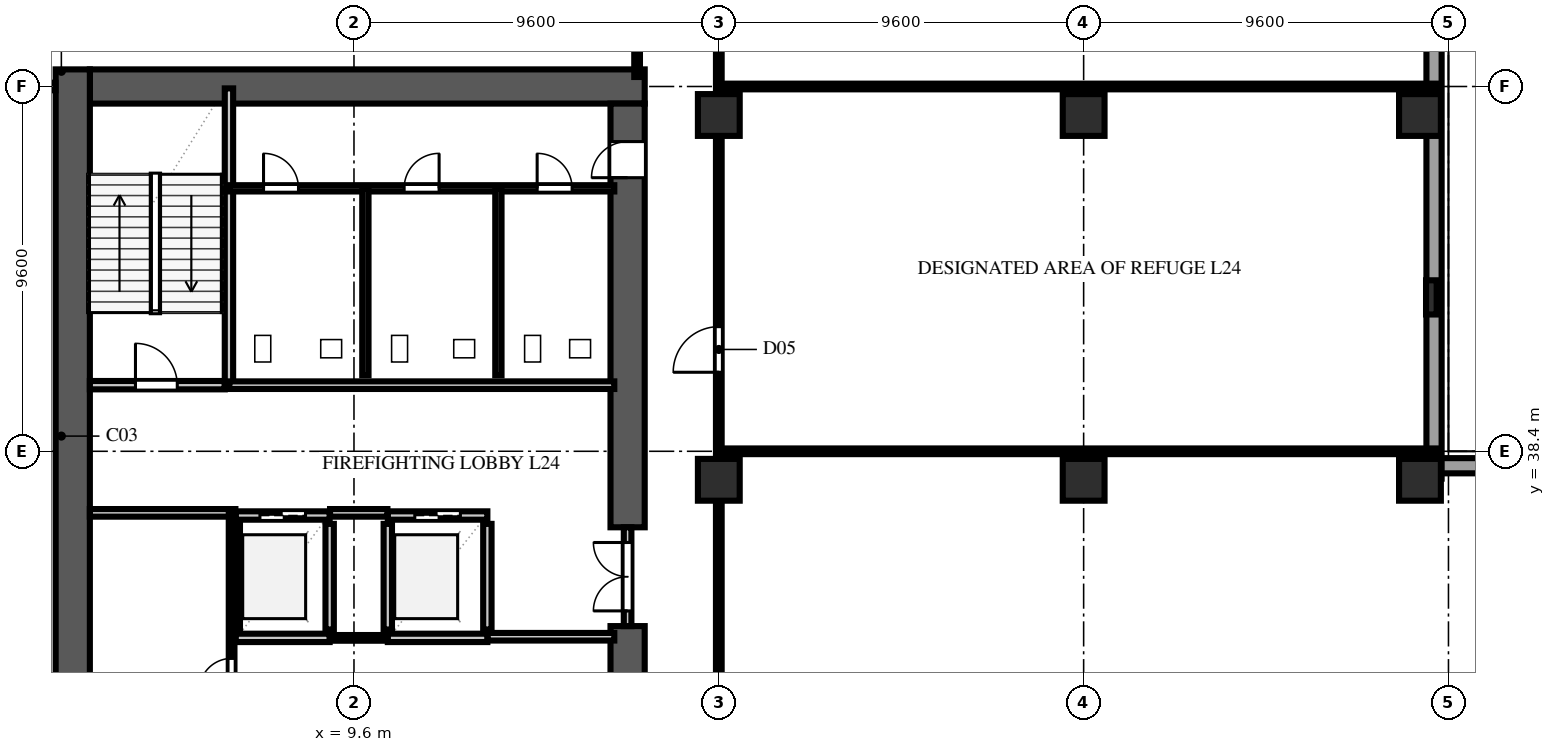
"""IFC4 building model, lengths in metres.
Left out: names, types, materials, properties, quantities, classifications, styles, units other than length and angle.
Written with IfcOpenShell. Run it as: python <this file> out.ifc"""

import sys

from ifc_helpers import new_model, si_unit, direction, frame, frame_2d, origin, origin_2d, place, context, subcontext, project, spatial, rectangle, extrude, element, fill, save


model = new_model("IFC4")
c1 = context("Model", 3, precision=1e-05, world=origin(), true_north=direction((0.0, 1.0)))
c2 = subcontext(c1, "Body", "Model", "MODEL_VIEW")
j1 = project(units=[si_unit("LENGTHUNIT", "METRE"), si_unit("PLANEANGLEUNIT", "RADIAN")], contexts=[c1])
p1 = place(None, origin())
s1 = spatial("IfcSite", under=j1, at=p1, CompositionType="ELEMENT")
p2 = place(p1, origin())
s2 = spatial("IfcBuilding", under=s1, at=p2, CompositionType="ELEMENT")
p3 = place(p2, frame((0.0, 0.0, 96.4)))
s3 = spatial("IfcBuildingStorey", under=s2, at=p3, CompositionType="ELEMENT", Elevation=96.4)
p4 = place(p3, frame((2.65, 48.0, 0.0), z_axis=(0.0, 0.0, 1.0), x_axis=(1.0, 0.0, 0.0)))
e1 = element("IfcWall", 1, at=p4, inside=s3, PredefinedType="SHEAR", context=c2, shape_type="SweptSolid", body=[
    extrude(rectangle(XDim=14.6, YDim=0.9, at=frame_2d((7.3, 0.0))), origin(), (0.0, 0.0, 1.0), 4.74),
])
p5 = place(p3, frame((2.2, 9.15, 0.0), z_axis=(0.0, 0.0, 1.0), x_axis=(0.0, 1.0, 0.0)))
e2 = element("IfcWall", 2, at=p5, inside=s3, PredefinedType="SHEAR", context=c2, shape_type="SweptSolid", body=[
    extrude(rectangle(XDim=39.3, YDim=0.9, at=frame_2d((19.65, 0.0))), origin(), (0.0, 0.0, 1.0), 4.74),
])
p6 = place(p3, frame((16.8, 26.0, 0.0), z_axis=(0.0, 0.0, 1.0), x_axis=(0.0, 1.0, 0.0)))
e3 = element("IfcWall", 3, at=p6, inside=s3, PredefinedType="SHEAR", context=c2, shape_type="SweptSolid", body=[
    extrude(rectangle(XDim=7.8, YDim=0.9, at=frame_2d((3.9, 0.0))), origin(), (0.0, 0.0, 1.0), 4.74),
])
p7 = place(p3, frame((16.8, 36.4, 0.0), z_axis=(0.0, 0.0, 1.0), x_axis=(0.0, 1.0, 0.0)))
e4 = element("IfcWall", 4, at=p7, inside=s3, PredefinedType="SHEAR", context=c2, shape_type="SweptSolid", body=[
    extrude(rectangle(XDim=11.15, YDim=0.9, at=frame_2d((5.575, 0.0))), origin(), (0.0, 0.0, 1.0), 4.74),
])
p8 = place(p7, frame((9.2, 0.0, 0.0)))
e5 = element("IfcOpeningElement", 5, at=p8, cuts=e4, PredefinedType="OPENING", context=c2, shape_type="SweptSolid", body=[
    extrude(rectangle(XDim=0.95, YDim=2.15, at=frame_2d((0.475, 1.075))), frame((0.0, 0.462, 0.0), z_axis=(0.0, -1.0, 0.0), x_axis=(1.0, 0.0, 0.0)), (0.0, 0.0, 1.0), 0.924),
])
for number, where, z_axis, x_axis in (
    (6, (19.2, 37.65, 0.0), (0.0, 0.0, 1.0), (1.0, 0.0, 0.0)),
    (7, (19.2, 47.25, 0.0), (0.0, 0.0, 1.0), (1.0, 0.0, 0.0)),
    (8, (28.8, 37.65, 0.0), (0.0, 0.0, 1.0), (1.0, 0.0, 0.0)),
    (9, (28.8, 47.25, 0.0), (0.0, 0.0, 1.0), (1.0, 0.0, 0.0)),
    (10, (37.65, 37.65, 0.0), (0.0, 0.0, 1.0), (1.0, 0.0, 0.0)),
    (11, (37.65, 47.25, 0.0), (0.0, 0.0, 1.0), (1.0, 0.0, 0.0)),
):
    element("IfcColumn", number, at=place(p3, frame(where, z_axis=z_axis, x_axis=x_axis)), inside=s3, PredefinedType="COLUMN", context=c2, shape_type="SweptSolid", body=[
        extrude(rectangle(XDim=1.1, YDim=1.1, at=origin_2d()), origin(), (0.0, 0.0, 1.0), 5.0),
    ])
p9 = place(p3, frame((37.95, 42.45, 0.0), z_axis=(0.0, 0.0, 1.0), x_axis=(0.0, 1.0, 0.0)))
e12 = element("IfcColumn", 12, at=p9, inside=s3, PredefinedType="PILASTER", context=c2, shape_type="SweptSolid", body=[
    extrude(rectangle(XDim=0.9, YDim=0.28, at=origin_2d()), origin(), (0.0, 0.0, 1.0), 5.0),
])
for number, where, z_axis, x_axis in (
    (13, (65.36, 38.02, 0.0), (0.0, 0.0, 1.0), (-1.0, 0.0, 0.0)),
    (14, (38.02, 37.68, 0.0), (0.0, 0.0, 1.0), (0.0, 1.0, 0.0)),
):
    element("IfcWall", number, at=place(p3, frame(where, z_axis=z_axis, x_axis=x_axis)), inside=s3, PredefinedType="SOLIDWALL", context=c2, shape_type="SweptSolid", body=[
        extrude(rectangle(XDim=27.68, YDim=0.4, at=frame_2d((13.84, 0.0))), origin(), (0.0, 0.0, 1.0), 4.74),
    ])
p10 = place(p3, frame((2.65, 40.14, 0.0), z_axis=(0.0, 0.0, 1.0), x_axis=(1.0, 0.0, 0.0)))
e15 = element("IfcWall", 15, at=p10, inside=s3, PredefinedType="SOLIDWALL", context=c2, shape_type="SweptSolid", body=[
    extrude(rectangle(XDim=3.55, YDim=0.22, at=frame_2d((1.775, 0.0))), origin(), (0.0, 0.0, 1.0), 4.74),
])
p11 = place(p10, frame((1.2, 0.0, 0.0)))
e16 = element("IfcOpeningElement", 16, at=p11, cuts=e15, PredefinedType="OPENING", context=c2, shape_type="SweptSolid", body=[
    extrude(rectangle(XDim=1.1, YDim=2.2, at=frame_2d((0.55, 1.1))), frame((0.0, 0.122, 0.0), z_axis=(0.0, -1.0, 0.0), x_axis=(1.0, 0.0, 0.0)), (0.0, 0.0, 1.0), 0.244),
])
p12 = place(p3, frame((6.31, 40.14, 0.0), z_axis=(0.0, 0.0, 1.0), x_axis=(0.0, 1.0, 0.0)))
e17 = element("IfcWall", 17, at=p12, inside=s3, PredefinedType="SOLIDWALL", context=c2, shape_type="SweptSolid", body=[
    extrude(rectangle(XDim=7.81, YDim=0.22, at=frame_2d((3.905, 0.0))), origin(), (0.0, 0.0, 1.0), 4.74),
])
for number, where, z_axis, x_axis in (
    (18, (6.49, 33.71, 0.0), (0.0, 0.0, 1.0), (0.0, 1.0, 0.0)),
    (19, (8.96, 33.71, 0.0), (0.0, 0.0, 1.0), (0.0, 1.0, 0.0)),
):
    element("IfcWall", number, at=place(p3, frame(where, z_axis=z_axis, x_axis=x_axis)), inside=s3, PredefinedType="SOLIDWALL", context=c2, shape_type="SweptSolid", body=[
        extrude(rectangle(XDim=2.78, YDim=0.22, at=frame_2d((1.39, 0.0))), origin(), (0.0, 0.0, 1.0), 4.74),
    ])
p13 = place(p3, frame((6.49, 33.49, 0.0), z_axis=(0.0, 0.0, 1.0), x_axis=(1.0, 0.0, 0.0)))
e20 = element("IfcWall", 20, at=p13, inside=s3, PredefinedType="SOLIDWALL", context=c2, shape_type="SweptSolid", body=[
    extrude(rectangle(XDim=2.47, YDim=0.22, at=frame_2d((1.235, 0.0))), origin(), (0.0, 0.0, 1.0), 4.74),
])
p14 = place(p3, frame((6.49, 36.71, 0.0), z_axis=(0.0, 0.0, 1.0), x_axis=(1.0, 0.0, 0.0)))
e21 = element("IfcWall", 21, at=p14, inside=s3, PredefinedType="SOLIDWALL", context=c2, shape_type="SweptSolid", body=[
    extrude(rectangle(XDim=2.47, YDim=0.22, at=frame_2d((1.235, 0.0))), origin(), (0.0, 0.0, 1.0), 4.74),
])
p15 = place(p14, frame((0.635, 0.0, 0.0)))
e22 = element("IfcOpeningElement", 22, at=p15, cuts=e21, PredefinedType="OPENING", context=c2, shape_type="SweptSolid", body=[
    extrude(rectangle(XDim=1.2, YDim=2.2, at=frame_2d((0.6, 1.1))), frame((0.0, 0.122, 0.0), z_axis=(0.0, -1.0, 0.0), x_axis=(1.0, 0.0, 0.0)), (0.0, 0.0, 1.0), 0.244),
])
for number, where, z_axis, x_axis in (
    (23, (10.49, 33.71, 0.0), (0.0, 0.0, 1.0), (0.0, 1.0, 0.0)),
    (24, (13.11, 33.71, 0.0), (0.0, 0.0, 1.0), (0.0, 1.0, 0.0)),
):
    element("IfcWall", number, at=place(p3, frame(where, z_axis=z_axis, x_axis=x_axis)), inside=s3, PredefinedType="SOLIDWALL", context=c2, shape_type="SweptSolid", body=[
        extrude(rectangle(XDim=2.78, YDim=0.22, at=frame_2d((1.39, 0.0))), origin(), (0.0, 0.0, 1.0), 4.74),
    ])
p16 = place(p3, frame((10.49, 33.49, 0.0), z_axis=(0.0, 0.0, 1.0), x_axis=(1.0, 0.0, 0.0)))
e25 = element("IfcWall", 25, at=p16, inside=s3, PredefinedType="SOLIDWALL", context=c2, shape_type="SweptSolid", body=[
    extrude(rectangle(XDim=2.62, YDim=0.22, at=frame_2d((1.31, 0.0))), origin(), (0.0, 0.0, 1.0), 4.74),
])
p17 = place(p3, frame((10.49, 36.71, 0.0), z_axis=(0.0, 0.0, 1.0), x_axis=(1.0, 0.0, 0.0)))
e26 = element("IfcWall", 26, at=p17, inside=s3, PredefinedType="SOLIDWALL", context=c2, shape_type="SweptSolid", body=[
    extrude(rectangle(XDim=2.62, YDim=0.22, at=frame_2d((1.31, 0.0))), origin(), (0.0, 0.0, 1.0), 4.74),
])
p18 = place(p17, frame((0.71, 0.0, 0.0)))
e27 = element("IfcOpeningElement", 27, at=p18, cuts=e26, PredefinedType="OPENING", context=c2, shape_type="SweptSolid", body=[
    extrude(rectangle(XDim=1.2, YDim=2.2, at=frame_2d((0.6, 1.1))), frame((0.0, 0.122, 0.0), z_axis=(0.0, -1.0, 0.0), x_axis=(1.0, 0.0, 0.0)), (0.0, 0.0, 1.0), 0.244),
])
p19 = place(p3, frame((2.65, 36.78, 0.0), z_axis=(0.0, 0.0, 1.0), x_axis=(1.0, 0.0, 0.0)))
e28 = element("IfcWall", 28, at=p19, inside=s3, PredefinedType="SOLIDWALL", context=c2, shape_type="SweptSolid", body=[
    extrude(rectangle(XDim=3.83, YDim=0.2, at=frame_2d((1.915, 0.0))), origin(), (0.0, 0.0, 1.0), 4.74),
])
p20 = place(p3, frame((8.97, 36.78, 0.0), z_axis=(0.0, 0.0, 1.0), x_axis=(1.0, 0.0, 0.0)))
e29 = element("IfcWall", 29, at=p20, inside=s3, PredefinedType="SOLIDWALL", context=c2, shape_type="SweptSolid", body=[
    extrude(rectangle(XDim=1.51, YDim=0.2, at=frame_2d((0.755, 0.0))), origin(), (0.0, 0.0, 1.0), 4.74),
])
p21 = place(p3, frame((13.12, 33.52, 0.0), z_axis=(0.0, 0.0, 1.0), x_axis=(1.0, 0.0, 0.0)))
e30 = element("IfcWall", 30, at=p21, inside=s3, PredefinedType="SOLIDWALL", context=c2, shape_type="SweptSolid", body=[
    extrude(rectangle(XDim=3.33, YDim=0.2, at=frame_2d((1.665, 0.0))), origin(), (0.0, 0.0, 1.0), 4.74),
])
p22 = place(p3, frame((6.32, 40.14, 0.0), z_axis=(0.0, 0.0, 1.0), x_axis=(1.0, 0.0, 0.0)))
e31 = element("IfcWall", 31, at=p22, inside=s3, PredefinedType="SOLIDWALL", context=c2, shape_type="SweptSolid", body=[
    extrude(rectangle(XDim=10.13, YDim=0.2, at=frame_2d((5.065, 0.0))), origin(), (0.0, 0.0, 1.0), 4.74),
])
p23 = place(p3, frame((16.8, 33.8, 0.0), z_axis=(0.0, 0.0, 1.0), x_axis=(0.0, 1.0, 0.0)))
e32 = element("IfcWall", 32, at=p23, inside=s3, PredefinedType="SOLIDWALL", context=c2, shape_type="SweptSolid", body=[
    extrude(rectangle(XDim=2.6, YDim=0.2, at=frame_2d((1.3, 0.0))), origin(), (0.0, 0.0, 1.0), 4.74),
])
p24 = place(p23, frame((0.4, 0.0, 0.0)))
e33 = element("IfcOpeningElement", 33, at=p24, cuts=e32, PredefinedType="OPENING", context=c2, shape_type="SweptSolid", body=[
    extrude(rectangle(XDim=1.8, YDim=2.2, at=frame_2d((0.9, 1.1))), frame((0.0, 0.112, 0.0), z_axis=(0.0, -1.0, 0.0), x_axis=(1.0, 0.0, 0.0)), (0.0, 0.0, 1.0), 0.224),
])
p25 = place(p3, frame((8.965, 33.49, 0.0), z_axis=(0.0, 0.0, 1.0), x_axis=(1.0, 0.0, 0.0)))
e34 = element("IfcWall", 34, at=p25, inside=s3, PredefinedType="PARTITIONING", context=c2, shape_type="SweptSolid", body=[
    extrude(rectangle(XDim=1.52, YDim=0.15, at=frame_2d((0.76, 0.0))), origin(), (0.0, 0.0, 1.0), 4.74),
])
p26 = place(p3, frame((6.38, 17.8, 0.0), z_axis=(0.0, 0.0, 1.0), x_axis=(0.0, 1.0, 0.0)))
e35 = element("IfcWall", 35, at=p26, inside=s3, PredefinedType="PARTITIONING", context=c2, shape_type="SweptSolid", body=[
    extrude(rectangle(XDim=18.98, YDim=0.15, at=frame_2d((9.49, 0.0))), origin(), (0.0, 0.0, 1.0), 4.74),
])
p27 = place(p26, frame((14.3, 0.0, 0.0)))
e36 = element("IfcOpeningElement", 36, at=p27, cuts=e35, PredefinedType="OPENING", context=c2, shape_type="SweptSolid", body=[
    extrude(rectangle(XDim=0.85, YDim=2.1, at=frame_2d((0.425, 1.05))), frame((0.0, 0.087, 0.0), z_axis=(0.0, -1.0, 0.0), x_axis=(1.0, 0.0, 0.0)), (0.0, 0.0, 1.0), 0.174),
])
p28 = place(p3, frame((6.32, 45.32, 0.0), z_axis=(0.0, 0.0, 1.0), x_axis=(1.0, 0.0, 0.0)))
e37 = element("IfcWall", 37, at=p28, inside=s3, PredefinedType="PLUMBINGWALL", context=c2, shape_type="SweptSolid", body=[
    extrude(rectangle(XDim=10.13, YDim=0.165, at=frame_2d((5.065, 0.0))), origin(), (0.0, 0.0, 1.0), 4.74),
])
p29 = place(p28, frame((0.9, 0.0, 0.0)))
e38 = element("IfcOpeningElement", 38, at=p29, cuts=e37, PredefinedType="OPENING", context=c2, shape_type="SweptSolid", body=[
    extrude(rectangle(XDim=0.92, YDim=2.15, at=frame_2d((0.46, 1.075))), frame((0.0, 0.094, 0.0), z_axis=(0.0, -1.0, 0.0), x_axis=(1.0, 0.0, 0.0)), (0.0, 0.0, 1.0), 0.189),
])
p30 = place(p28, frame((4.6, 0.0, 0.0)))
e39 = element("IfcOpeningElement", 39, at=p30, cuts=e37, PredefinedType="OPENING", context=c2, shape_type="SweptSolid", body=[
    extrude(rectangle(XDim=0.92, YDim=2.15, at=frame_2d((0.46, 1.075))), frame((0.0, 0.094, 0.0), z_axis=(0.0, -1.0, 0.0), x_axis=(1.0, 0.0, 0.0)), (0.0, 0.0, 1.0), 0.189),
])
p31 = place(p28, frame((8.1, 0.0, 0.0)))
e40 = element("IfcOpeningElement", 40, at=p31, cuts=e37, PredefinedType="OPENING", context=c2, shape_type="SweptSolid", body=[
    extrude(rectangle(XDim=0.92, YDim=2.15, at=frame_2d((0.46, 1.075))), frame((0.0, 0.094, 0.0), z_axis=(0.0, -1.0, 0.0), x_axis=(1.0, 0.0, 0.0)), (0.0, 0.0, 1.0), 0.189),
])
for number, where, z_axis, x_axis in (
    (41, (9.9, 40.4, 0.0), (0.0, 0.0, 1.0), (0.0, 1.0, 0.0)),
    (42, (13.4, 40.4, 0.0), (0.0, 0.0, 1.0), (0.0, 1.0, 0.0)),
):
    element("IfcWall", number, at=place(p3, frame(where, z_axis=z_axis, x_axis=x_axis)), inside=s3, PredefinedType="PLUMBINGWALL", context=c2, shape_type="SweptSolid", body=[
        extrude(rectangle(XDim=4.92, YDim=0.165, at=frame_2d((2.46, 0.0))), origin(), (0.0, 0.0, 1.0), 4.74),
    ])
p32 = place(p3, frame((0.85, 48.0, 0.0), z_axis=(0.0, 0.0, 1.0), x_axis=(1.0, 0.0, 0.0)))
e43 = element("IfcWall", 43, at=p32, inside=s3, PredefinedType="SOLIDWALL", context=c2, shape_type="SweptSolid", body=[
    extrude(rectangle(XDim=0.895, YDim=0.2, at=frame_2d((0.448, 0.0))), origin(), (0.0, 0.0, 1.0), 4.74),
])
for number, where, z_axis, x_axis in (
    (44, (19.2, 38.4, 0.0), (0.0, 0.0, 1.0), (1.0, 0.0, 0.0)),
    (45, (19.2, 48.0, 0.0), (0.0, 0.0, 1.0), (1.0, 0.0, 0.0)),
):
    element("IfcWall", number, at=place(p3, frame(where, z_axis=z_axis, x_axis=x_axis)), inside=s3, PredefinedType="PARTITIONING", context=c2, shape_type="SweptSolid", body=[
        extrude(rectangle(XDim=18.98, YDim=0.15, at=frame_2d((9.49, 0.0))), origin(), (0.0, 0.0, 1.0), 4.74),
    ])
p33 = place(p3, frame((19.2, 9.98, 0.0), z_axis=(0.0, 0.0, 1.0), x_axis=(0.0, 1.0, 0.0)))
e46 = element("IfcWall", 46, at=p33, inside=s3, PredefinedType="PARTITIONING", context=c2, shape_type="SweptSolid", body=[
    extrude(rectangle(XDim=56.47, YDim=0.15, at=frame_2d((28.235, 0.0))), origin(), (0.0, 0.0, 1.0), 3.967),
])
p34 = place(p33, frame((2.0, 0.0, 0.0)))
e47 = element("IfcOpeningElement", 47, at=p34, cuts=e46, PredefinedType="OPENING", context=c2, shape_type="SweptSolid", body=[
    extrude(rectangle(XDim=1.8, YDim=2.2, at=frame_2d((0.9, 1.1))), frame((0.0, 0.087, 0.0), z_axis=(0.0, -1.0, 0.0), x_axis=(1.0, 0.0, 0.0)), (0.0, 0.0, 1.0), 0.174),
])
p35 = place(p33, frame((12.0, 0.0, 0.0)))
e48 = element("IfcOpeningElement", 48, at=p35, cuts=e46, PredefinedType="OPENING", context=c2, shape_type="SweptSolid", body=[
    extrude(rectangle(XDim=1.8, YDim=2.2, at=frame_2d((0.9, 1.1))), frame((0.0, 0.087, 0.0), z_axis=(0.0, -1.0, 0.0), x_axis=(1.0, 0.0, 0.0)), (0.0, 0.0, 1.0), 0.174),
])
p36 = place(p33, frame((30.5, 0.0, 0.0)))
e49 = element("IfcOpeningElement", 49, at=p36, cuts=e46, PredefinedType="OPENING", context=c2, shape_type="SweptSolid", body=[
    extrude(rectangle(XDim=1.2, YDim=2.2, at=frame_2d((0.6, 1.1))), frame((0.0, 0.087, 0.0), z_axis=(0.0, -1.0, 0.0), x_axis=(1.0, 0.0, 0.0)), (0.0, 0.0, 1.0), 0.174),
])
p37 = place(p33, frame((40.5, 0.0, 0.0)))
e50 = element("IfcOpeningElement", 50, at=p37, cuts=e46, PredefinedType="OPENING", context=c2, shape_type="SweptSolid", body=[
    extrude(rectangle(XDim=1.8, YDim=2.2, at=frame_2d((0.9, 1.1))), frame((0.0, 0.087, 0.0), z_axis=(0.0, -1.0, 0.0), x_axis=(1.0, 0.0, 0.0)), (0.0, 0.0, 1.0), 0.174),
])
p38 = place(p3, frame((17.05, 48.25, 0.0), z_axis=(0.0, 0.0, 1.0), x_axis=(0.0, 1.0, 0.0)))
e51 = element("IfcWall", 51, at=p38, inside=s3, PredefinedType="PARTITIONING", context=c2, shape_type="SweptSolid", body=[
    extrude(rectangle(XDim=18.73, YDim=0.15, at=frame_2d((9.365, 0.0))), origin(), (0.0, 0.0, 1.0), 4.74),
])
p39 = place(p38, frame((2.2, 0.0, 0.0)))
e52 = element("IfcOpeningElement", 52, at=p39, cuts=e51, PredefinedType="OPENING", context=c2, shape_type="SweptSolid", body=[
    extrude(rectangle(XDim=1.8, YDim=2.2, at=frame_2d((0.9, 1.1))), frame((0.0, 0.087, 0.0), z_axis=(0.0, -1.0, 0.0), x_axis=(1.0, 0.0, 0.0)), (0.0, 0.0, 1.0), 0.174),
])
p40 = place(p11, origin())
e53 = element("IfcDoor", 53, at=p40, inside=s3, OperationType="SINGLE_SWING_LEFT", PredefinedType="DOOR", context=c2, shape_type="SweptSolid", body=[
    extrude(rectangle(XDim=1.1, YDim=2.2, at=frame_2d((0.55, 1.1))), frame((0.0, 0.025, 0.0), z_axis=(0.0, -1.0, 0.0), x_axis=(1.0, 0.0, 0.0)), (0.0, 0.0, 1.0), 0.05),
])
fill(e16, e53)
p41 = place(p15, origin())
e54 = element("IfcDoor", 54, at=p41, inside=s3, OperationType="DOUBLE_DOOR_SLIDING", PredefinedType="DOOR", context=c2, shape_type="SweptSolid", body=[
    extrude(rectangle(XDim=1.2, YDim=2.2, at=frame_2d((0.6, 1.1))), frame((0.0, 0.025, 0.0), z_axis=(0.0, -1.0, 0.0), x_axis=(1.0, 0.0, 0.0)), (0.0, 0.0, 1.0), 0.05),
])
fill(e22, e54)
p42 = place(p18, origin())
e55 = element("IfcDoor", 55, at=p42, inside=s3, OperationType="DOUBLE_DOOR_SLIDING", PredefinedType="DOOR", context=c2, shape_type="SweptSolid", body=[
    extrude(rectangle(XDim=1.2, YDim=2.2, at=frame_2d((0.6, 1.1))), frame((0.0, 0.025, 0.0), z_axis=(0.0, -1.0, 0.0), x_axis=(1.0, 0.0, 0.0)), (0.0, 0.0, 1.0), 0.05),
])
fill(e27, e55)
p43 = place(p8, origin())
e56 = element("IfcDoor", 56, at=p43, inside=s3, OperationType="SINGLE_SWING_LEFT", PredefinedType="DOOR", context=c2, shape_type="SweptSolid", body=[
    extrude(rectangle(XDim=0.95, YDim=2.15, at=frame_2d((0.475, 1.075))), frame((0.0, 0.025, 0.0), z_axis=(0.0, -1.0, 0.0), x_axis=(1.0, 0.0, 0.0)), (0.0, 0.0, 1.0), 0.05),
])
fill(e5, e56)
p44 = place(p24, origin())
e57 = element("IfcDoor", 57, at=p44, inside=s3, OperationType="DOUBLE_DOOR_SINGLE_SWING", PredefinedType="DOOR", context=c2, shape_type="SweptSolid", body=[
    extrude(rectangle(XDim=1.8, YDim=2.2, at=frame_2d((0.9, 1.1))), frame((0.0, 0.025, 0.0), z_axis=(0.0, -1.0, 0.0), x_axis=(1.0, 0.0, 0.0)), (0.0, 0.0, 1.0), 0.05),
])
fill(e33, e57)
p45 = place(p27, origin())
e58 = element("IfcDoor", 58, at=p45, inside=s3, OperationType="SINGLE_SWING_LEFT", PredefinedType="DOOR", context=c2, shape_type="SweptSolid", body=[
    extrude(rectangle(XDim=0.85, YDim=2.1, at=frame_2d((0.425, 1.05))), frame((0.0, 0.025, 0.0), z_axis=(0.0, -1.0, 0.0), x_axis=(1.0, 0.0, 0.0)), (0.0, 0.0, 1.0), 0.05),
])
fill(e36, e58)
p46 = place(p29, origin())
e59 = element("IfcDoor", 59, at=p46, inside=s3, OperationType="SINGLE_SWING_LEFT", PredefinedType="DOOR", context=c2, shape_type="SweptSolid", body=[
    extrude(rectangle(XDim=0.92, YDim=2.15, at=frame_2d((0.46, 1.075))), frame((0.0, 0.025, 0.0), z_axis=(0.0, -1.0, 0.0), x_axis=(1.0, 0.0, 0.0)), (0.0, 0.0, 1.0), 0.05),
])
fill(e38, e59)
p47 = place(p30, origin())
e60 = element("IfcDoor", 60, at=p47, inside=s3, OperationType="SINGLE_SWING_RIGHT", PredefinedType="DOOR", context=c2, shape_type="SweptSolid", body=[
    extrude(rectangle(XDim=0.92, YDim=2.15, at=frame_2d((0.46, 1.075))), frame((0.0, 0.025, 0.0), z_axis=(0.0, -1.0, 0.0), x_axis=(1.0, 0.0, 0.0)), (0.0, 0.0, 1.0), 0.05),
])
fill(e39, e60)
p48 = place(p31, origin())
e61 = element("IfcDoor", 61, at=p48, inside=s3, OperationType="SINGLE_SWING_LEFT", PredefinedType="DOOR", context=c2, shape_type="SweptSolid", body=[
    extrude(rectangle(XDim=0.92, YDim=2.15, at=frame_2d((0.46, 1.075))), frame((0.0, 0.025, 0.0), z_axis=(0.0, -1.0, 0.0), x_axis=(1.0, 0.0, 0.0)), (0.0, 0.0, 1.0), 0.05),
])
fill(e40, e61)
p49 = place(p36, origin())
e62 = element("IfcDoor", 62, at=p49, inside=s3, OperationType="SINGLE_SWING_LEFT", PredefinedType="DOOR", context=c2, shape_type="SweptSolid", body=[
    extrude(rectangle(XDim=1.2, YDim=2.2, at=frame_2d((0.6, 1.1))), frame((0.0, 0.025, 0.0), z_axis=(0.0, -1.0, 0.0), x_axis=(1.0, 0.0, 0.0)), (0.0, 0.0, 1.0), 0.05),
])
fill(e49, e62)
save(model, sys.argv[1])
